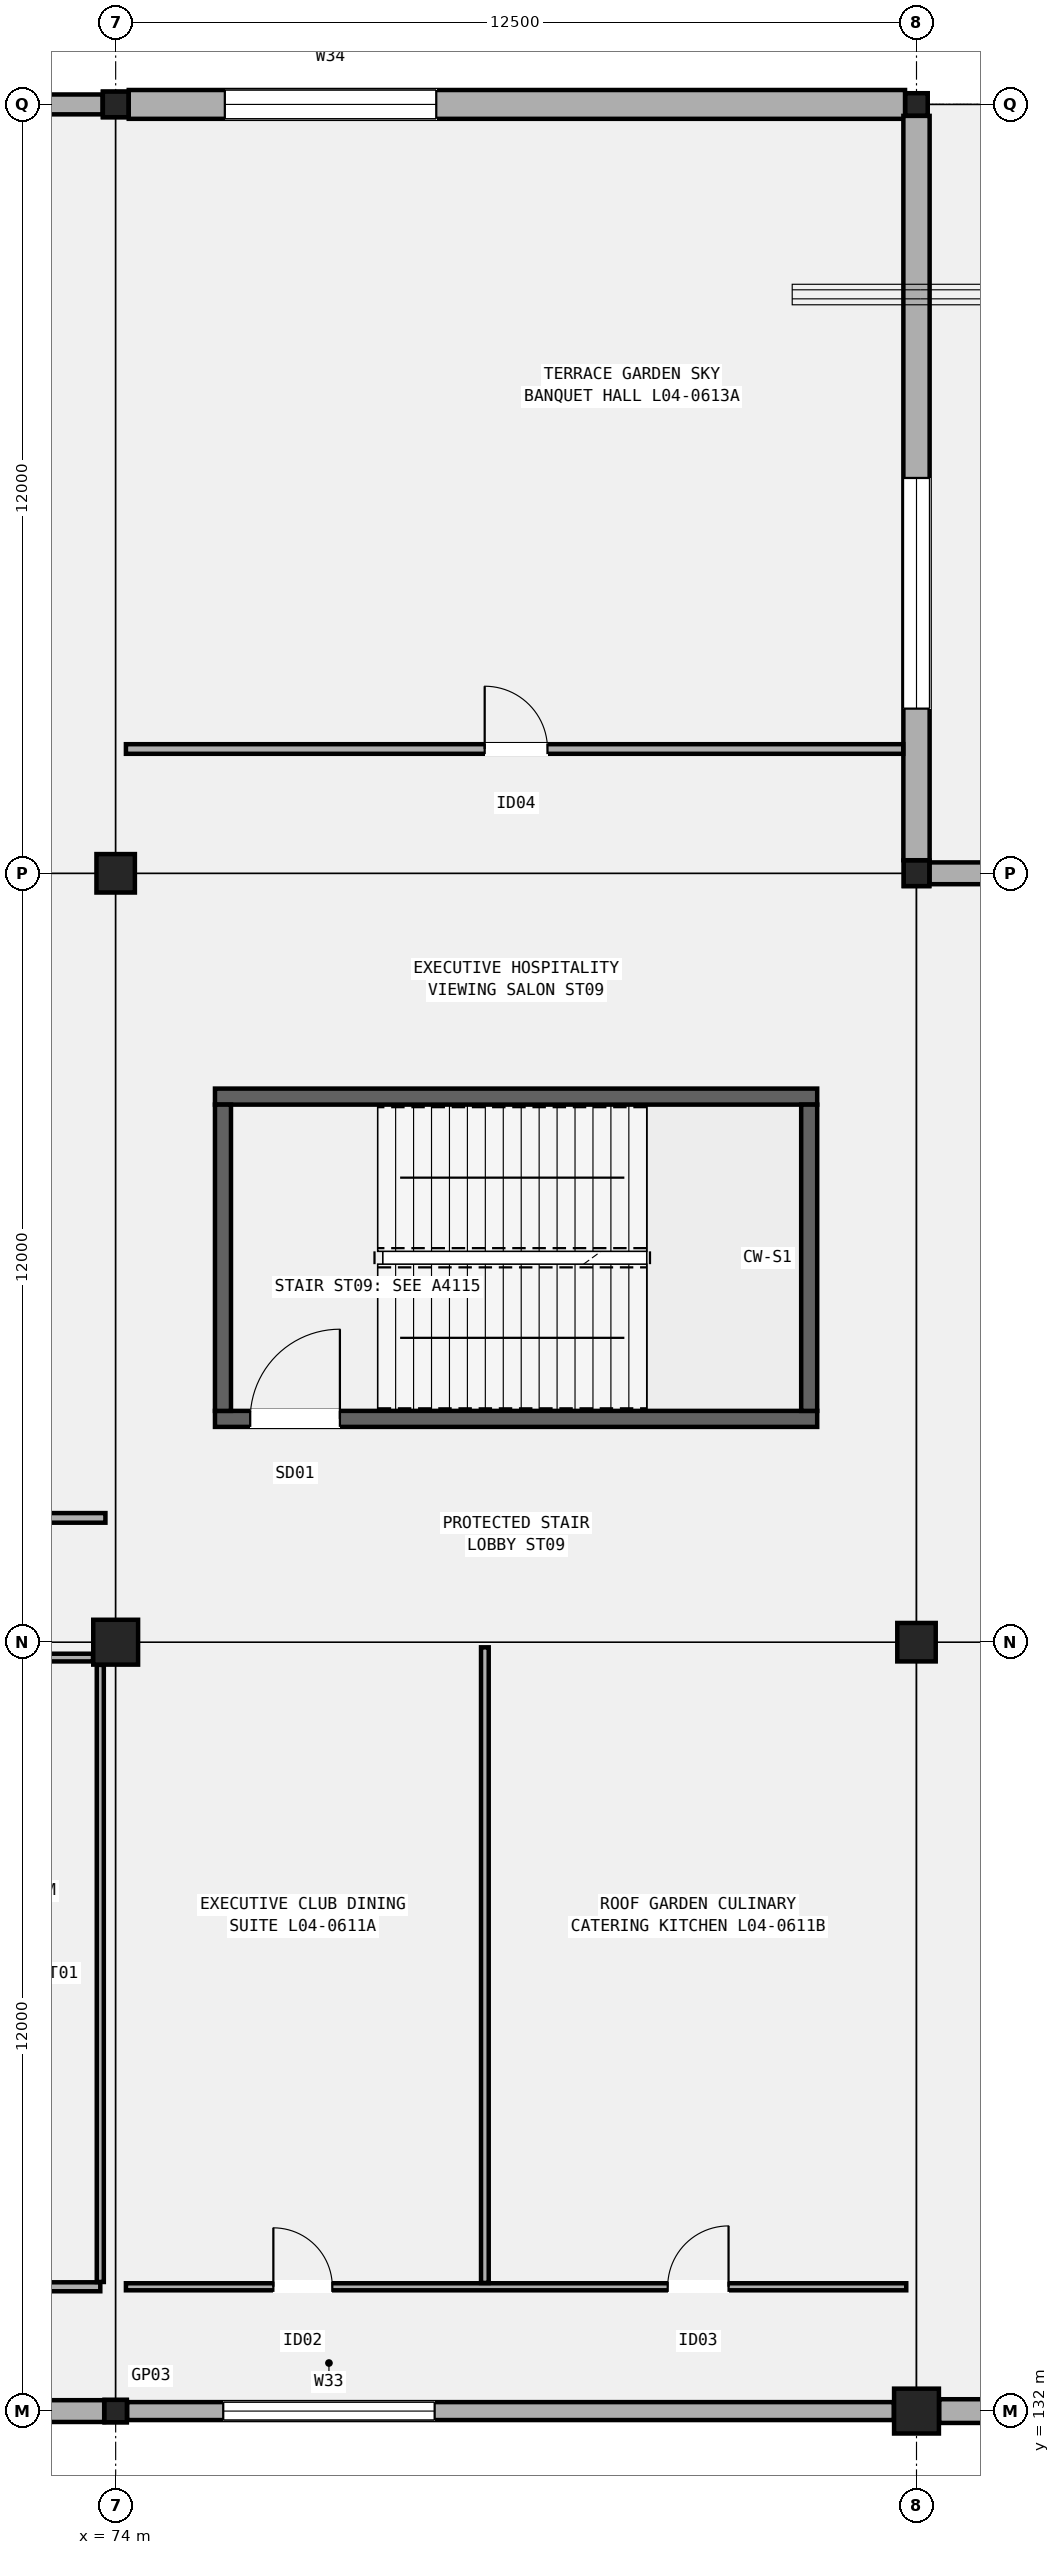
"""IFC4 building model, lengths in metres.
Left out: names, types, materials, properties, quantities, classifications, styles, units other than length and angle.
Written with IfcOpenShell. Run it as: python <this file> out.ifc"""

import sys

from ifc_helpers import new_model, si_unit, direction, frame, frame_2d, origin, origin_2d, place, context, subcontext, project, spatial, rectangle, hollow_rectangle, extrude, element, fill, save


model = new_model("IFC4")
c1 = context("Model", 3, precision=1e-05, world=origin(), true_north=direction((0.0, 1.0)))
c2 = subcontext(c1, "Body", "Model", "MODEL_VIEW")
j1 = project(units=[si_unit("LENGTHUNIT", "METRE"), si_unit("PLANEANGLEUNIT", "RADIAN")], contexts=[c1])
p1 = place(None, origin())
s1 = spatial("IfcSite", under=j1, at=p1, CompositionType="ELEMENT")
p2 = place(p1, origin())
s2 = spatial("IfcBuilding", under=s1, at=p2, CompositionType="ELEMENT")
p3 = place(p2, frame((0.0, 0.0, 20.4)))
s3 = spatial("IfcBuildingStorey", under=s2, at=p3, CompositionType="ELEMENT", Elevation=20.4)
p4 = place(p3, frame((74.0, 132.0, 0.0), z_axis=(0.0, 0.0, 1.0), x_axis=(1.0, 0.0, 0.0)))
e1 = element("IfcColumn", 1, at=p4, inside=s3, PredefinedType="COLUMN", context=c2, shape_type="SweptSolid", body=[
    extrude(hollow_rectangle(XDim=0.35, YDim=0.35, WallThickness=0.016, InnerFilletRadius=0.016, OuterFilletRadius=0.032, at=origin_2d()), origin(), (0.0, 0.0, 1.0), 5.4),
])
p5 = place(p3, frame((74.0, 144.0, 0.0), z_axis=(0.0, 0.0, 1.0), x_axis=(1.0, 0.0, 0.0)))
e2 = element("IfcColumn", 2, at=p5, inside=s3, PredefinedType="COLUMN", context=c2, shape_type="SweptSolid", body=[
    extrude(rectangle(XDim=0.7, YDim=0.7, at=origin_2d()), origin(), (0.0, 0.0, 1.0), 5.4),
])
p6 = place(p3, frame((74.0, 156.0, 0.0), z_axis=(0.0, 0.0, 1.0), x_axis=(1.0, 0.0, 0.0)))
e3 = element("IfcColumn", 3, at=p6, inside=s3, PredefinedType="COLUMN", context=c2, shape_type="SweptSolid", body=[
    extrude(rectangle(XDim=0.6, YDim=0.6, at=origin_2d()), origin(), (0.0, 0.0, 1.0), 5.4),
])
p7 = place(p3, frame((74.0, 168.0, 0.0), z_axis=(0.0, 0.0, 1.0), x_axis=(1.0, 0.0, 0.0)))
e4 = element("IfcColumn", 4, at=p7, inside=s3, PredefinedType="COLUMN", context=c2, shape_type="SweptSolid", body=[
    extrude(hollow_rectangle(XDim=0.4, YDim=0.4, WallThickness=0.016, InnerFilletRadius=0.016, OuterFilletRadius=0.032, at=origin_2d()), origin(), (0.0, 0.0, 1.0), 5.4),
])
p8 = place(p3, frame((86.5, 132.0, 0.0), z_axis=(0.0, 0.0, 1.0), x_axis=(1.0, 0.0, 0.0)))
e5 = element("IfcColumn", 5, at=p8, inside=s3, PredefinedType="COLUMN", context=c2, shape_type="SweptSolid", body=[
    extrude(rectangle(XDim=0.7, YDim=0.7, at=origin_2d()), origin(), (0.0, 0.0, 1.0), 5.4),
])
p9 = place(p3, frame((86.5, 144.0, 0.0), z_axis=(0.0, 0.0, 1.0), x_axis=(1.0, 0.0, 0.0)))
e6 = element("IfcColumn", 6, at=p9, inside=s3, PredefinedType="COLUMN", context=c2, shape_type="SweptSolid", body=[
    extrude(rectangle(XDim=0.6, YDim=0.6, at=origin_2d()), origin(), (0.0, 0.0, 1.0), 5.4),
])
p10 = place(p3, frame((86.5, 156.0, 0.0), z_axis=(0.0, 0.0, 1.0), x_axis=(1.0, 0.0, 0.0)))
e7 = element("IfcColumn", 7, at=p10, inside=s3, PredefinedType="COLUMN", context=c2, shape_type="SweptSolid", body=[
    extrude(hollow_rectangle(XDim=0.4, YDim=0.4, WallThickness=0.016, InnerFilletRadius=0.016, OuterFilletRadius=0.032, at=origin_2d()), origin(), (0.0, 0.0, 1.0), 5.4),
])
p11 = place(p3, frame((86.5, 168.0, 0.0), z_axis=(0.0, 0.0, 1.0), x_axis=(1.0, 0.0, 0.0)))
e8 = element("IfcColumn", 8, at=p11, inside=s3, PredefinedType="COLUMN", context=c2, shape_type="SweptSolid", body=[
    extrude(hollow_rectangle(XDim=0.35, YDim=0.35, WallThickness=0.016, InnerFilletRadius=0.016, OuterFilletRadius=0.032, at=origin_2d()), origin(), (0.0, 0.0, 1.0), 5.4),
])
p12 = place(p3, frame((61.704, 132.0, 0.0), z_axis=(0.0, 0.0, 1.0), x_axis=(1.0, 0.0, 0.0)))
e9 = element("IfcWall", 9, at=p12, inside=s3, PredefinedType="SOLIDWALL", context=c2, shape_type="SweptSolid", body=[
    extrude(rectangle(XDim=12.117, YDim=0.34, at=frame_2d((6.059, 0.0))), origin(), (0.0, 0.0, 1.0), 4.58),
])
p13 = place(p12, frame((1.5, 0.0, 0.95)))
e10 = element("IfcOpeningElement", 10, at=p13, cuts=e9, PredefinedType="OPENING", context=c2, shape_type="SweptSolid", body=[
    extrude(rectangle(XDim=3.0, YDim=2.15, at=frame_2d((1.5, 1.075))), frame((0.0, 0.18, 0.0), z_axis=(0.0, -1.0, 0.0), x_axis=(1.0, 0.0, 0.0)), (0.0, 0.0, 1.0), 0.36),
])
p14 = place(p3, frame((61.804, 168.0, 0.0), z_axis=(0.0, 0.0, 1.0), x_axis=(1.0, 0.0, 0.0)))
e11 = element("IfcWall", 11, at=p14, inside=s3, PredefinedType="SOLIDWALL", context=c2, shape_type="SweptSolid", body=[
    extrude(rectangle(XDim=11.992, YDim=0.31, at=frame_2d((5.996, 0.0))), origin(), (0.0, 0.0, 1.0), 4.58),
])
p15 = place(p14, frame((2.75, 0.0, 0.95)))
e12 = element("IfcOpeningElement", 12, at=p15, cuts=e11, PredefinedType="OPENING", context=c2, shape_type="SweptSolid", body=[
    extrude(rectangle(XDim=3.15, YDim=1.9, at=frame_2d((1.575, 0.95))), frame((0.0, 0.165, 0.0), z_axis=(0.0, -1.0, 0.0), x_axis=(1.0, 0.0, 0.0)), (0.0, 0.0, 1.0), 0.33),
])
p16 = place(p3, frame((74.179, 132.0, 0.0), z_axis=(0.0, 0.0, 1.0), x_axis=(1.0, 0.0, 0.0)))
e13 = element("IfcWall", 13, at=p16, inside=s3, PredefinedType="SOLIDWALL", context=c2, shape_type="SweptSolid", body=[
    extrude(rectangle(XDim=11.967, YDim=0.28, at=frame_2d((5.983, 0.0))), origin(), (0.0, 0.0, 1.0), 4.592),
])
p17 = place(p16, frame((1.5, 0.0, 0.95)))
e14 = element("IfcOpeningElement", 14, at=p17, cuts=e13, PredefinedType="OPENING", context=c2, shape_type="SweptSolid", body=[
    extrude(rectangle(XDim=3.3, YDim=1.8, at=frame_2d((1.65, 0.9))), frame((0.0, 0.15, 0.0), z_axis=(0.0, -1.0, 0.0), x_axis=(1.0, 0.0, 0.0)), (0.0, 0.0, 1.0), 0.3),
])
p18 = place(p3, frame((74.204, 168.0, 0.0), z_axis=(0.0, 0.0, 1.0), x_axis=(1.0, 0.0, 0.0)))
e15 = element("IfcWall", 15, at=p18, inside=s3, PredefinedType="SOLIDWALL", context=c2, shape_type="SweptSolid", body=[
    extrude(rectangle(XDim=12.117, YDim=0.45, at=frame_2d((6.059, 0.0))), origin(), (0.0, 0.0, 1.0), 4.592),
])
p19 = place(p18, frame((1.5, 0.0, 0.95)))
e16 = element("IfcOpeningElement", 16, at=p19, cuts=e15, PredefinedType="OPENING", context=c2, shape_type="SweptSolid", body=[
    extrude(rectangle(XDim=3.3, YDim=2.25, at=frame_2d((1.65, 1.125))), frame((0.0, 0.235, 0.0), z_axis=(0.0, -1.0, 0.0), x_axis=(1.0, 0.0, 0.0)), (0.0, 0.0, 1.0), 0.47),
])
p20 = place(p3, frame((86.5, 156.204, 0.0), z_axis=(0.0, 0.0, 1.0), x_axis=(0.0, 1.0, 0.0)))
e17 = element("IfcWall", 17, at=p20, inside=s3, PredefinedType="SOLIDWALL", context=c2, shape_type="SweptSolid", body=[
    extrude(rectangle(XDim=11.617, YDim=0.41, at=frame_2d((5.809, 0.0))), origin(), (0.0, 0.0, 1.0), 4.592),
])
p21 = place(p20, frame((2.366, 0.0, 0.95)))
e18 = element("IfcOpeningElement", 18, at=p21, cuts=e17, PredefinedType="OPENING", context=c2, shape_type="SweptSolid", body=[
    extrude(rectangle(XDim=3.6, YDim=1.75, at=frame_2d((1.8, 0.875))), frame((0.0, 0.215, 0.0), z_axis=(0.0, -1.0, 0.0), x_axis=(1.0, 0.0, 0.0)), (0.0, 0.0, 1.0), 0.43),
])
p22 = place(p3, frame((86.854, 132.0, 0.0), z_axis=(0.0, 0.0, 1.0), x_axis=(1.0, 0.0, 0.0)))
e19 = element("IfcWall", 19, at=p22, inside=s3, PredefinedType="SOLIDWALL", context=c2, shape_type="SweptSolid", body=[
    extrude(rectangle(XDim=11.842, YDim=0.37, at=frame_2d((5.921, 0.0))), origin(), (0.0, 0.0, 1.0), 4.48),
])
p23 = place(p22, frame((1.5, 0.0, 0.95)))
e20 = element("IfcOpeningElement", 20, at=p23, cuts=e19, PredefinedType="OPENING", context=c2, shape_type="SweptSolid", body=[
    extrude(rectangle(XDim=3.6, YDim=2.15, at=frame_2d((1.8, 1.075))), frame((0.0, 0.195, 0.0), z_axis=(0.0, -1.0, 0.0), x_axis=(1.0, 0.0, 0.0)), (0.0, 0.0, 1.0), 0.39),
])
p24 = place(p3, frame((86.704, 156.0, 0.0), z_axis=(0.0, 0.0, 1.0), x_axis=(1.0, 0.0, 0.0)))
e21 = element("IfcWall", 21, at=p24, inside=s3, PredefinedType="SOLIDWALL", context=c2, shape_type="SweptSolid", body=[
    extrude(rectangle(XDim=12.117, YDim=0.34, at=frame_2d((6.059, 0.0))), origin(), (0.0, 0.0, 1.0), 4.592),
])
p25 = place(p24, frame((1.5, 0.0, 0.95)))
e22 = element("IfcOpeningElement", 22, at=p25, cuts=e21, PredefinedType="OPENING", context=c2, shape_type="SweptSolid", body=[
    extrude(rectangle(XDim=0.9, YDim=2.1, at=frame_2d((0.45, 1.05))), frame((0.0, 0.18, 0.0), z_axis=(0.0, -1.0, 0.0), x_axis=(1.0, 0.0, 0.0)), (0.0, 0.0, 1.0), 0.36),
])
p26 = place(p3, frame((75.55, 147.485, 0.0), z_axis=(0.0, 0.0, 1.0), x_axis=(1.0, 0.0, 0.0)))
e23 = element("IfcWall", 23, at=p26, inside=s3, PredefinedType="SHEAR", context=c2, shape_type="SweptSolid", body=[
    extrude(rectangle(XDim=9.4, YDim=0.25, at=frame_2d((4.7, 0.0))), origin(), (0.0, 0.0, 1.0), 5.18),
])
p27 = place(p26, frame((0.55, 0.0, 0.0)))
e24 = element("IfcOpeningElement", 24, at=p27, cuts=e23, PredefinedType="OPENING", context=c2, shape_type="SweptSolid", body=[
    extrude(rectangle(XDim=1.4, YDim=2.15, at=frame_2d((0.7, 1.075))), frame((0.0, 0.135, 0.0), z_axis=(0.0, -1.0, 0.0), x_axis=(1.0, 0.0, 0.0)), (0.0, 0.0, 1.0), 0.27),
])
p28 = place(p3, frame((75.55, 152.515, 0.0), z_axis=(0.0, 0.0, 1.0), x_axis=(1.0, 0.0, 0.0)))
e25 = element("IfcWall", 25, at=p28, inside=s3, PredefinedType="SHEAR", context=c2, shape_type="SweptSolid", body=[
    extrude(rectangle(XDim=9.4, YDim=0.25, at=frame_2d((4.7, 0.0))), origin(), (0.0, 0.0, 1.0), 5.18),
])
for number, where, z_axis, x_axis in (
    (26, (75.675, 147.61, 0.0), (0.0, 0.0, 1.0), (0.0, 1.0, 0.0)),
    (27, (84.825, 147.61, 0.0), (0.0, 0.0, 1.0), (0.0, 1.0, 0.0)),
):
    element("IfcWall", number, at=place(p3, frame(where, z_axis=z_axis, x_axis=x_axis)), inside=s3, PredefinedType="SHEAR", context=c2, shape_type="SweptSolid", body=[
        extrude(rectangle(XDim=4.78, YDim=0.25, at=frame_2d((2.39, 0.0))), origin(), (0.0, 0.0, 1.0), 5.18),
    ])
p29 = place(p3, frame((61.74, 133.94, 0.0), z_axis=(0.0, 0.0, 1.0), x_axis=(1.0, 0.0, 0.0)))
e28 = element("IfcWall", 28, at=p29, inside=s3, PredefinedType="PARTITIONING", context=c2, shape_type="SweptSolid", body=[
    extrude(rectangle(XDim=12.02, YDim=0.14, at=frame_2d((6.01, 0.0))), origin(), (0.0, 0.0, 1.0), 4.52),
])
p30 = place(p29, frame((0.631, 0.0, 0.0)))
e29 = element("IfcOpeningElement", 29, at=p30, cuts=e28, PredefinedType="OPENING", context=c2, shape_type="SweptSolid", body=[
    extrude(rectangle(XDim=1.6, YDim=2.3, at=frame_2d((0.8, 1.15))), frame((0.0, 0.08, 0.0), z_axis=(0.0, -1.0, 0.0), x_axis=(1.0, 0.0, 0.0)), (0.0, 0.0, 1.0), 0.16),
])
p31 = place(p29, frame((4.327, 0.0, 0.0)))
e30 = element("IfcOpeningElement", 30, at=p31, cuts=e28, PredefinedType="OPENING", context=c2, shape_type="SweptSolid", body=[
    extrude(rectangle(XDim=1.65, YDim=2.28, at=frame_2d((0.825, 1.14))), frame((0.0, 0.08, 0.0), z_axis=(0.0, -1.0, 0.0), x_axis=(1.0, 0.0, 0.0)), (0.0, 0.0, 1.0), 0.16),
])
p32 = place(p29, frame((8.881, 0.0, 0.0)))
e31 = element("IfcOpeningElement", 31, at=p32, cuts=e28, PredefinedType="OPENING", context=c2, shape_type="SweptSolid", body=[
    extrude(rectangle(XDim=1.7, YDim=2.32, at=frame_2d((0.85, 1.16))), frame((0.0, 0.08, 0.0), z_axis=(0.0, -1.0, 0.0), x_axis=(1.0, 0.0, 0.0)), (0.0, 0.0, 1.0), 0.16),
])
p33 = place(p3, frame((73.76, 134.015, 0.0), z_axis=(0.0, 0.0, 1.0), x_axis=(0.0, 1.0, 0.0)))
e32 = element("IfcWall", 32, at=p33, inside=s3, PredefinedType="PARTITIONING", context=c2, shape_type="SweptSolid", body=[
    extrude(rectangle(XDim=9.631, YDim=0.11, at=frame_2d((4.815, 0.0))), origin(), (0.0, 0.0, 1.0), 4.52),
])
p34 = place(p3, frame((61.84, 143.76, 0.0), z_axis=(0.0, 0.0, 1.0), x_axis=(1.0, 0.0, 0.0)))
e33 = element("IfcWall", 33, at=p34, inside=s3, PredefinedType="PARTITIONING", context=c2, shape_type="SweptSolid", body=[
    extrude(rectangle(XDim=11.806, YDim=0.12, at=frame_2d((5.903, 0.0))), origin(), (0.0, 0.0, 1.0), 4.52),
])
p35 = place(p3, frame((61.66, 145.94, 0.0), z_axis=(0.0, 0.0, 1.0), x_axis=(1.0, 0.0, 0.0)))
e34 = element("IfcWall", 34, at=p35, inside=s3, PredefinedType="PARTITIONING", context=c2, shape_type="SweptSolid", body=[
    extrude(rectangle(XDim=12.18, YDim=0.15, at=frame_2d((6.09, 0.0))), origin(), (0.0, 0.0, 1.0), 4.52),
])
p36 = place(p35, frame((1.017, 0.0, 0.0)))
e35 = element("IfcOpeningElement", 35, at=p36, cuts=e34, PredefinedType="OPENING", context=c2, shape_type="SweptSolid", body=[
    extrude(rectangle(XDim=1.76, YDim=2.3, at=frame_2d((0.88, 1.15))), frame((0.0, 0.085, 0.0), z_axis=(0.0, -1.0, 0.0), x_axis=(1.0, 0.0, 0.0)), (0.0, 0.0, 1.0), 0.17),
])
p37 = place(p35, frame((7.617, 0.0, 0.0)))
e36 = element("IfcOpeningElement", 36, at=p37, cuts=e34, PredefinedType="OPENING", context=c2, shape_type="SweptSolid", body=[
    extrude(rectangle(XDim=0.9, YDim=2.06, at=frame_2d((0.45, 1.03))), frame((0.0, 0.085, 0.0), z_axis=(0.0, -1.0, 0.0), x_axis=(1.0, 0.0, 0.0)), (0.0, 0.0, 1.0), 0.17),
])
p38 = place(p3, frame((74.16, 133.94, 0.0), z_axis=(0.0, 0.0, 1.0), x_axis=(1.0, 0.0, 0.0)))
e37 = element("IfcWall", 37, at=p38, inside=s3, PredefinedType="PARTITIONING", context=c2, shape_type="SweptSolid", body=[
    extrude(rectangle(XDim=12.18, YDim=0.11, at=frame_2d((6.09, 0.0))), origin(), (0.0, 0.0, 1.0), 4.52),
])
p39 = place(p38, frame((2.302, 0.0, 0.0)))
e38 = element("IfcOpeningElement", 38, at=p39, cuts=e37, PredefinedType="OPENING", context=c2, shape_type="SweptSolid", body=[
    extrude(rectangle(XDim=0.92, YDim=2.1, at=frame_2d((0.46, 1.05))), frame((0.0, 0.065, 0.0), z_axis=(0.0, -1.0, 0.0), x_axis=(1.0, 0.0, 0.0)), (0.0, 0.0, 1.0), 0.13),
])
p40 = place(p38, frame((8.456, 0.0, 0.0)))
e39 = element("IfcOpeningElement", 39, at=p40, cuts=e37, PredefinedType="OPENING", context=c2, shape_type="SweptSolid", body=[
    extrude(rectangle(XDim=0.95, YDim=2.12, at=frame_2d((0.475, 1.06))), frame((0.0, 0.065, 0.0), z_axis=(0.0, -1.0, 0.0), x_axis=(1.0, 0.0, 0.0)), (0.0, 0.0, 1.0), 0.13),
])
p41 = place(p3, frame((79.763, 134.0, 0.0), z_axis=(0.0, 0.0, 1.0), x_axis=(0.0, 1.0, 0.0)))
e40 = element("IfcWall", 40, at=p41, inside=s3, PredefinedType="PARTITIONING", context=c2, shape_type="SweptSolid", body=[
    extrude(rectangle(XDim=9.92, YDim=0.12, at=frame_2d((4.96, 0.0))), origin(), (0.0, 0.0, 1.0), 4.52),
])
p42 = place(p3, frame((74.16, 157.94, 0.0), z_axis=(0.0, 0.0, 1.0), x_axis=(1.0, 0.0, 0.0)))
e41 = element("IfcWall", 41, at=p42, inside=s3, PredefinedType="PARTITIONING", context=c2, shape_type="SweptSolid", body=[
    extrude(rectangle(XDim=12.133, YDim=0.15, at=frame_2d((6.066, 0.0))), origin(), (0.0, 0.0, 1.0), 4.52),
])
p43 = place(p42, frame((5.6, 0.0, 0.0)))
e42 = element("IfcOpeningElement", 42, at=p43, cuts=e41, PredefinedType="OPENING", context=c2, shape_type="SweptSolid", body=[
    extrude(rectangle(XDim=0.98, YDim=2.1, at=frame_2d((0.49, 1.05))), frame((0.0, 0.085, 0.0), z_axis=(0.0, -1.0, 0.0), x_axis=(1.0, 0.0, 0.0)), (0.0, 0.0, 1.0), 0.17),
])
p44 = place(p17, origin())
e43 = element("IfcWindow", 43, at=p44, inside=s3, PartitioningType="SINGLE_PANEL", PredefinedType="WINDOW", context=c2, shape_type="SweptSolid", body=[
    extrude(rectangle(XDim=3.3, YDim=1.8, at=frame_2d((1.65, 0.9))), frame((0.0, 0.03, 0.0), z_axis=(0.0, -1.0, 0.0), x_axis=(1.0, 0.0, 0.0)), (0.0, 0.0, 1.0), 0.06),
])
fill(e14, e43)
p45 = place(p19, origin())
e44 = element("IfcWindow", 44, at=p45, inside=s3, PartitioningType="SINGLE_PANEL", PredefinedType="WINDOW", context=c2, shape_type="SweptSolid", body=[
    extrude(rectangle(XDim=3.3, YDim=2.25, at=frame_2d((1.65, 1.125))), frame((0.0, 0.03, 0.0), z_axis=(0.0, -1.0, 0.0), x_axis=(1.0, 0.0, 0.0)), (0.0, 0.0, 1.0), 0.06),
])
fill(e16, e44)
p46 = place(p21, origin())
e45 = element("IfcWindow", 45, at=p46, inside=s3, PartitioningType="SINGLE_PANEL", PredefinedType="WINDOW", context=c2, shape_type="SweptSolid", body=[
    extrude(rectangle(XDim=3.6, YDim=1.75, at=frame_2d((1.8, 0.875))), frame((0.0, 0.03, 0.0), z_axis=(0.0, -1.0, 0.0), x_axis=(1.0, 0.0, 0.0)), (0.0, 0.0, 1.0), 0.06),
])
fill(e18, e45)
p47 = place(p27, origin())
e46 = element("IfcDoor", 46, at=p47, inside=s3, OperationType="SINGLE_SWING_RIGHT", PredefinedType="DOOR", context=c2, shape_type="SweptSolid", body=[
    extrude(rectangle(XDim=1.4, YDim=2.15, at=frame_2d((0.7, 1.075))), frame((0.0, 0.025, 0.0), z_axis=(0.0, -1.0, 0.0), x_axis=(1.0, 0.0, 0.0)), (0.0, 0.0, 1.0), 0.05),
])
fill(e24, e46)
p48 = place(p39, origin())
e47 = element("IfcDoor", 47, at=p48, inside=s3, OperationType="SINGLE_SWING_LEFT", PredefinedType="DOOR", context=c2, shape_type="SweptSolid", body=[
    extrude(rectangle(XDim=0.92, YDim=2.1, at=frame_2d((0.46, 1.05))), frame((0.0, 0.025, 0.0), z_axis=(0.0, -1.0, 0.0), x_axis=(1.0, 0.0, 0.0)), (0.0, 0.0, 1.0), 0.05),
])
fill(e38, e47)
p49 = place(p40, origin())
e48 = element("IfcDoor", 48, at=p49, inside=s3, OperationType="SINGLE_SWING_RIGHT", PredefinedType="DOOR", context=c2, shape_type="SweptSolid", body=[
    extrude(rectangle(XDim=0.95, YDim=2.12, at=frame_2d((0.475, 1.06))), frame((0.0, 0.025, 0.0), z_axis=(0.0, -1.0, 0.0), x_axis=(1.0, 0.0, 0.0)), (0.0, 0.0, 1.0), 0.05),
])
fill(e39, e48)
p50 = place(p43, origin())
e49 = element("IfcDoor", 49, at=p50, inside=s3, OperationType="SINGLE_SWING_LEFT", PredefinedType="DOOR", context=c2, shape_type="SweptSolid", body=[
    extrude(rectangle(XDim=0.98, YDim=2.1, at=frame_2d((0.49, 1.05))), frame((0.0, 0.025, 0.0), z_axis=(0.0, -1.0, 0.0), x_axis=(1.0, 0.0, 0.0)), (0.0, 0.0, 1.0), 0.05),
])
fill(e42, e49)
save(model, sys.argv[1])
